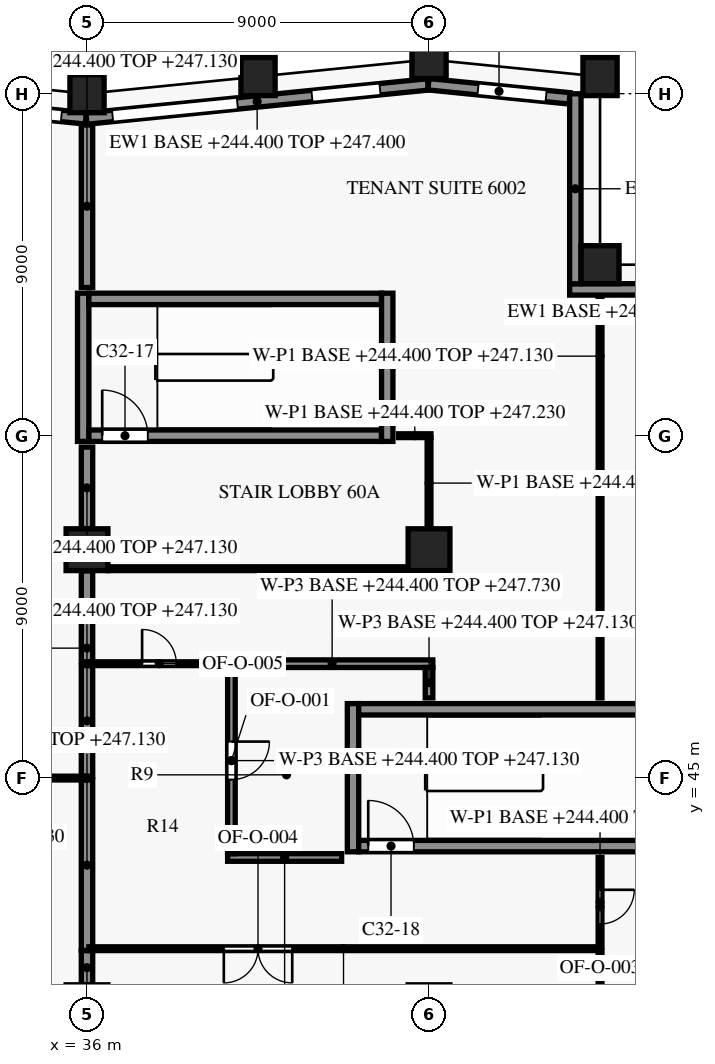
"""IFC4 building model, lengths in metres.
Left out: names, types, materials, properties, quantities, classifications, styles, units other than length and angle.
Written with IfcOpenShell. Run it as: python <this file> out.ifc"""

import sys

from ifc_helpers import new_model, si_unit, direction, frame, frame_2d, origin, origin_2d, place, context, subcontext, project, spatial, rectangle, extrude, element, fill, save


model = new_model("IFC4")
c1 = context("Model", 3, precision=1e-05, world=origin(), true_north=direction((0.0, 1.0)))
c2 = subcontext(c1, "Body", "Model", "MODEL_VIEW")
j1 = project(units=[si_unit("LENGTHUNIT", "METRE"), si_unit("PLANEANGLEUNIT", "RADIAN")], contexts=[c1])
p1 = place(None, origin())
s1 = spatial("IfcSite", under=j1, at=p1, CompositionType="ELEMENT")
p2 = place(p1, origin())
s2 = spatial("IfcBuilding", under=s1, at=p2, CompositionType="ELEMENT")
p3 = place(p2, frame((0.0, 0.0, 244.4)))
s3 = spatial("IfcBuildingStorey", under=s2, at=p3, CompositionType="ELEMENT", Elevation=244.4)
for number, where, z_axis, x_axis in (
    (1, (49.5, 63.45, 0.0), (0.0, 0.0, 1.0), (-0.995, 0.1, 0.0)),
    (2, (45.0, 63.9, 0.0), (0.0, 0.0, 1.0), (-1.0, 0.0, 0.0)),
    (3, (40.5, 63.45, 0.0), (0.0, 0.0, 1.0), (-0.995, -0.1, 0.0)),
    (4, (36.0, 63.0, 0.0), (0.0, 0.0, 1.0), (-1.0, 0.0, 0.0)),
):
    element("IfcColumn", number, at=place(p3, frame(where, z_axis=z_axis, x_axis=x_axis)), inside=s3, PredefinedType="COLUMN", context=c2, shape_type="SweptSolid", body=[
        extrude(rectangle(XDim=0.9, YDim=1.0, at=origin_2d()), origin(), (0.0, 0.0, 1.0), 3.8),
    ])
p4 = place(p3, frame((49.5, 58.5, 0.0), z_axis=(0.0, 0.0, 1.0), x_axis=(1.0, 0.0, 0.0)))
e5 = element("IfcColumn", 5, at=p4, inside=s3, PredefinedType="COLUMN", context=c2, shape_type="SweptSolid", body=[
    extrude(rectangle(XDim=1.0, YDim=1.0, at=origin_2d()), origin(), (0.0, 0.0, 1.0), 3.8),
])
for number, where, z_axis, x_axis in (
    (6, (36.0, 51.0, 0.0), (0.0, 0.0, 1.0), (1.0, 0.0, 0.0)),
    (7, (45.0, 51.0, 0.0), (0.0, 0.0, 1.0), (1.0, 0.0, 0.0)),
):
    element("IfcColumn", number, at=place(p3, frame(where, z_axis=z_axis, x_axis=x_axis)), inside=s3, PredefinedType="COLUMN", context=c2, shape_type="SweptSolid", body=[
        extrude(rectangle(XDim=1.1, YDim=1.1, at=origin_2d()), origin(), (0.0, 0.0, 1.0), 3.8),
    ])
p5 = place(p3, frame((48.7, 57.85, 0.0), z_axis=(0.0, 0.0, 1.0), x_axis=(1.0, 0.0, 0.0)))
e8 = element("IfcWall", 8, at=p5, inside=s3, PredefinedType="SOLIDWALL", context=c2, shape_type="SweptSolid", body=[
    extrude(rectangle(XDim=4.502, YDim=0.3, at=frame_2d((2.251, 0.0))), origin(), (0.0, 0.0, 1.0), 3.0),
])
p6 = place(p3, frame((48.85, 62.998, 0.0), z_axis=(0.0, 0.0, 1.0), x_axis=(0.0, -1.0, 0.0)))
e9 = element("IfcWall", 9, at=p6, inside=s3, PredefinedType="SOLIDWALL", context=c2, shape_type="SweptSolid", body=[
    extrude(rectangle(XDim=5.0, YDim=0.3, at=frame_2d((2.5, 0.0))), origin(), (0.0, 0.0, 1.0), 3.0),
])
p7 = place(p3, frame((44.985, 63.248, 0.0), z_axis=(0.0, 0.0, 1.0), x_axis=(0.995037837869, -0.099497242219, 0.0)))
e10 = element("IfcWall", 10, at=p7, inside=s3, PredefinedType="SOLIDWALL", context=c2, shape_type="SweptSolid", body=[
    extrude(rectangle(XDim=3.732, YDim=0.3, at=frame_2d((1.866, 0.0))), origin(), (0.0, 0.0, 1.0), 3.0),
])
p8 = place(p7, frame((1.311, 0.0, 0.75)))
e11 = element("IfcOpeningElement", 11, at=p8, cuts=e10, PredefinedType="OPENING", context=c2, shape_type="SweptSolid", body=[
    extrude(rectangle(XDim=1.8, YDim=1.8, at=frame_2d((0.9, 0.9))), frame((0.0, 0.16, 0.0), z_axis=(0.0, -1.0, 0.0), x_axis=(1.0, 0.0, 0.0)), (0.0, 0.0, 1.0), 0.32),
])
p9 = place(p3, frame((35.985, 62.345, 0.0), z_axis=(0.0, 0.0, 1.0), x_axis=(0.995035316196, 0.099522457379, 0.0)))
e12 = element("IfcWall", 12, at=p9, inside=s3, PredefinedType="SOLIDWALL", context=c2, shape_type="SweptSolid", body=[
    extrude(rectangle(XDim=9.03, YDim=0.3, at=frame_2d((4.515, 0.0))), origin(), (0.0, 0.0, 1.0), 3.0),
])
p10 = place(p9, frame((0.691, 0.0, 0.15)))
e13 = element("IfcOpeningElement", 13, at=p10, cuts=e12, PredefinedType="OPENING", context=c2, shape_type="SweptSolid", body=[
    extrude(rectangle(XDim=3.3, YDim=2.4, at=frame_2d((1.65, 1.2))), frame((0.0, 0.16, 0.0), z_axis=(0.0, -1.0, 0.0), x_axis=(1.0, 0.0, 0.0)), (0.0, 0.0, 1.0), 0.32),
])
p11 = place(p9, frame((5.964, 0.0, 0.75)))
e14 = element("IfcOpeningElement", 14, at=p11, cuts=e12, PredefinedType="OPENING", context=c2, shape_type="SweptSolid", body=[
    extrude(rectangle(XDim=1.8, YDim=1.8, at=frame_2d((0.9, 0.9))), frame((0.0, 0.16, 0.0), z_axis=(0.0, -1.0, 0.0), x_axis=(1.0, 0.0, 0.0)), (0.0, 0.0, 1.0), 0.32),
])
p12 = place(p3, frame((27.085, 63.238, 0.0), z_axis=(0.0, 0.0, 1.0), x_axis=(0.995035836657, -0.099517253618, 0.0)))
e15 = element("IfcWall", 15, at=p12, inside=s3, PredefinedType="SOLIDWALL", context=c2, shape_type="SweptSolid", body=[
    extrude(rectangle(XDim=8.93, YDim=0.3, at=frame_2d((4.465, 0.0))), origin(), (0.0, 0.0, 1.0), 3.0),
])
p13 = place(p12, frame((1.211, 0.0, 0.75)))
e16 = element("IfcOpeningElement", 16, at=p13, cuts=e15, PredefinedType="OPENING", context=c2, shape_type="SweptSolid", body=[
    extrude(rectangle(XDim=1.8, YDim=1.8, at=frame_2d((0.9, 0.9))), frame((0.0, 0.16, 0.0), z_axis=(0.0, -1.0, 0.0), x_axis=(1.0, 0.0, 0.0)), (0.0, 0.0, 1.0), 0.32),
])
p14 = place(p12, frame((4.984, 0.0, 0.15)))
e17 = element("IfcOpeningElement", 17, at=p14, cuts=e15, PredefinedType="OPENING", context=c2, shape_type="SweptSolid", body=[
    extrude(rectangle(XDim=3.3, YDim=2.4, at=frame_2d((1.65, 1.2))), frame((0.0, 0.16, 0.0), z_axis=(0.0, -1.0, 0.0), x_axis=(1.0, 0.0, 0.0)), (0.0, 0.0, 1.0), 0.32),
])
p15 = place(p3, frame((43.15, 43.2, 0.0), z_axis=(0.0, 0.0, 1.0), x_axis=(1.0, 0.0, 0.0)))
e18 = element("IfcWall", 18, at=p15, inside=s3, PredefinedType="SHEAR", context=c2, shape_type="SweptSolid", body=[
    extrude(rectangle(XDim=7.7, YDim=0.3, at=frame_2d((3.85, 0.0))), origin(), (0.0, 0.0, 1.0), 3.5),
])
p16 = place(p15, frame((0.25, 0.0, 0.0)))
e19 = element("IfcOpeningElement", 19, at=p16, cuts=e18, PredefinedType="OPENING", context=c2, shape_type="SweptSolid", body=[
    extrude(rectangle(XDim=1.2, YDim=2.2, at=frame_2d((0.6, 1.1))), frame((0.0, 0.16, 0.0), z_axis=(0.0, -1.0, 0.0), x_axis=(1.0, 0.0, 0.0)), (0.0, 0.0, 1.0), 0.32),
])
p17 = place(p3, frame((43.15, 46.8, 0.0), z_axis=(0.0, 0.0, 1.0), x_axis=(1.0, 0.0, 0.0)))
e20 = element("IfcWall", 20, at=p17, inside=s3, PredefinedType="SHEAR", context=c2, shape_type="SweptSolid", body=[
    extrude(rectangle(XDim=7.7, YDim=0.3, at=frame_2d((3.85, 0.0))), origin(), (0.0, 0.0, 1.0), 3.5),
])
p18 = place(p3, frame((36.05, 54.0, 0.0), z_axis=(0.0, 0.0, 1.0), x_axis=(1.0, 0.0, 0.0)))
e21 = element("IfcWall", 21, at=p18, inside=s3, PredefinedType="SHEAR", context=c2, shape_type="SweptSolid", body=[
    extrude(rectangle(XDim=7.7, YDim=0.3, at=frame_2d((3.85, 0.0))), origin(), (0.0, 0.0, 1.0), 3.5),
])
p19 = place(p18, frame((0.35, 0.0, 0.0)))
e22 = element("IfcOpeningElement", 22, at=p19, cuts=e21, PredefinedType="OPENING", context=c2, shape_type="SweptSolid", body=[
    extrude(rectangle(XDim=1.2, YDim=2.2, at=frame_2d((0.6, 1.1))), frame((0.0, 0.16, 0.0), z_axis=(0.0, -1.0, 0.0), x_axis=(1.0, 0.0, 0.0)), (0.0, 0.0, 1.0), 0.32),
])
p20 = place(p3, frame((36.05, 57.6, 0.0), z_axis=(0.0, 0.0, 1.0), x_axis=(1.0, 0.0, 0.0)))
e23 = element("IfcWall", 23, at=p20, inside=s3, PredefinedType="SHEAR", context=c2, shape_type="SweptSolid", body=[
    extrude(rectangle(XDim=7.7, YDim=0.3, at=frame_2d((3.85, 0.0))), origin(), (0.0, 0.0, 1.0), 3.5),
])
for number, where, z_axis, x_axis in (
    (24, (35.9, 53.85, 0.0), (0.0, 0.0, 1.0), (0.0, 1.0, 0.0)),
    (25, (43.0, 43.05, 0.0), (0.0, 0.0, 1.0), (0.0, 1.0, 0.0)),
    (26, (43.9, 53.85, 0.0), (0.0, 0.0, 1.0), (0.0, 1.0, 0.0)),
):
    element("IfcWall", number, at=place(p3, frame(where, z_axis=z_axis, x_axis=x_axis)), inside=s3, PredefinedType="SHEAR", context=c2, shape_type="SweptSolid", body=[
        extrude(rectangle(XDim=3.9, YDim=0.3, at=frame_2d((1.95, 0.0))), origin(), (0.0, 0.0, 1.0), 3.5),
    ])
p21 = place(p3, frame((49.5, 32.32, 0.0), z_axis=(0.0, 0.0, 1.0), x_axis=(0.0, 1.0, 0.0)))
e27 = element("IfcWall", 27, at=p21, inside=s3, PredefinedType="PARTITIONING", context=c2, shape_type="SweptSolid", body=[
    extrude(rectangle(XDim=8.13, YDim=0.1, at=frame_2d((4.065, 0.0))), origin(), (0.0, 0.0, 1.0), 2.73),
])
p22 = place(p3, frame((36.0, 39.555, 0.0), z_axis=(0.0, 0.0, 1.0), x_axis=(0.0, 1.0, 0.0)))
e28 = element("IfcWall", 28, at=p22, inside=s3, PredefinedType="PARTITIONING", context=c2, shape_type="SweptSolid", body=[
    extrude(rectangle(XDim=0.895, YDim=0.3, at=frame_2d((0.448, 0.0))), origin(), (0.0, 0.0, 1.0), 2.73),
])
p23 = place(p3, frame((49.45, 40.5, 0.0), z_axis=(0.0, 0.0, 1.0), x_axis=(-1.0, 0.0, 0.0)))
e29 = element("IfcWall", 29, at=p23, inside=s3, PredefinedType="PARTITIONING", context=c2, shape_type="SweptSolid", body=[
    extrude(rectangle(XDim=13.4, YDim=0.1, at=frame_2d((6.7, 0.0))), origin(), (0.0, 0.0, 1.0), 2.73),
])
p24 = place(p23, frame((8.05, 0.0, 0.0)))
e30 = element("IfcOpeningElement", 30, at=p24, cuts=e29, PredefinedType="OPENING", context=c2, shape_type="SweptSolid", body=[
    extrude(rectangle(XDim=1.8, YDim=2.1, at=frame_2d((0.9, 1.05))), frame((0.0, 0.06, 0.0), z_axis=(0.0, -1.0, 0.0), x_axis=(1.0, 0.0, 0.0)), (0.0, 0.0, 1.0), 0.12),
])
p25 = place(p3, frame((36.0, 40.455, 0.0), z_axis=(0.0, 0.0, 1.0), x_axis=(0.0, 1.0, 0.0)))
e31 = element("IfcWall", 31, at=p25, inside=s3, PredefinedType="PARTITIONING", context=c2, shape_type="SweptSolid", body=[
    extrude(rectangle(XDim=4.485, YDim=0.3, at=frame_2d((2.242, 0.0))), origin(), (0.0, 0.0, 1.0), 2.73),
])
p26 = place(p3, frame((39.7, 42.9, 0.0), z_axis=(0.0, 0.0, 1.0), x_axis=(1.0, 0.0, 0.0)))
e32 = element("IfcWall", 32, at=p26, inside=s3, PredefinedType="PARTITIONING", context=c2, shape_type="SweptSolid", body=[
    extrude(rectangle(XDim=3.0, YDim=0.2, at=frame_2d((1.5, 0.0))), origin(), (0.0, 0.0, 1.0), 2.73),
])
p27 = place(p3, frame((49.5, 42.9, 0.0), z_axis=(0.0, 0.0, 1.0), x_axis=(0.0, -1.0, 0.0)))
e33 = element("IfcWall", 33, at=p27, inside=s3, PredefinedType="PARTITIONING", context=c2, shape_type="SweptSolid", body=[
    extrude(rectangle(XDim=2.35, YDim=0.1, at=frame_2d((1.175, 0.0))), origin(), (0.0, 0.0, 1.0), 2.73),
])
p28 = place(p27, frame((0.85, 0.0, 0.0)))
e34 = element("IfcOpeningElement", 34, at=p28, cuts=e33, PredefinedType="OPENING", context=c2, shape_type="SweptSolid", body=[
    extrude(rectangle(XDim=0.9, YDim=2.1, at=frame_2d((0.45, 1.05))), frame((0.0, 0.06, 0.0), z_axis=(0.0, -1.0, 0.0), x_axis=(1.0, 0.0, 0.0)), (0.0, 0.0, 1.0), 0.12),
])
p29 = place(p3, frame((30.05, 44.99, 0.0), z_axis=(0.0, 0.0, 1.0), x_axis=(1.0, 0.0, 0.0)))
e35 = element("IfcWall", 35, at=p29, inside=s3, PredefinedType="PARTITIONING", context=c2, shape_type="SweptSolid", body=[
    extrude(rectangle(XDim=5.9, YDim=0.1, at=frame_2d((2.95, 0.0))), origin(), (0.0, 0.0, 1.0), 2.73),
])
p30 = place(p3, frame((36.0, 45.04, 0.0), z_axis=(0.0, 0.0, 1.0), x_axis=(0.0, 1.0, 0.0)))
e36 = element("IfcWall", 36, at=p30, inside=s3, PredefinedType="PARTITIONING", context=c2, shape_type="SweptSolid", body=[
    extrude(rectangle(XDim=2.91, YDim=0.3, at=frame_2d((1.455, 0.0))), origin(), (0.0, 0.0, 1.0), 2.73),
])
p31 = place(p3, frame((49.5, 47.1, 0.0), z_axis=(0.0, 0.0, 1.0), x_axis=(0.0, 1.0, 0.0)))
e37 = element("IfcWall", 37, at=p31, inside=s3, PredefinedType="PARTITIONING", context=c2, shape_type="SweptSolid", body=[
    extrude(rectangle(XDim=10.58, YDim=0.1, at=frame_2d((5.29, 0.0))), origin(), (0.0, 0.0, 1.0), 2.73),
])
p32 = place(p3, frame((39.8, 47.9, 0.0), z_axis=(0.0, 0.0, 1.0), x_axis=(0.0, -1.0, 0.0)))
e38 = element("IfcWall", 38, at=p32, inside=s3, PredefinedType="PARTITIONING", context=c2, shape_type="SweptSolid", body=[
    extrude(rectangle(XDim=4.9, YDim=0.2, at=frame_2d((2.45, 0.0))), origin(), (0.0, 0.0, 1.0), 2.73),
])
p33 = place(p32, frame((1.95, 0.0, 0.0)))
e39 = element("IfcOpeningElement", 39, at=p33, cuts=e38, PredefinedType="OPENING", context=c2, shape_type="SweptSolid", body=[
    extrude(rectangle(XDim=1.0, YDim=2.1, at=frame_2d((0.5, 1.05))), frame((0.0, 0.11, 0.0), z_axis=(0.0, -1.0, 0.0), x_axis=(1.0, 0.0, 0.0)), (0.0, 0.0, 1.0), 0.22),
])
p34 = place(p3, frame((45.0, 47.9, 0.0), z_axis=(0.0, 0.0, 1.0), x_axis=(0.0, -1.0, 0.0)))
e40 = element("IfcWall", 40, at=p34, inside=s3, PredefinedType="PARTITIONING", context=c2, shape_type="SweptSolid", body=[
    extrude(rectangle(XDim=0.8, YDim=0.2, at=frame_2d((0.4, 0.0))), origin(), (0.0, 0.0, 1.0), 2.73),
])
p35 = place(p3, frame((36.05, 48.0, 0.0), z_axis=(0.0, 0.0, 1.0), x_axis=(1.0, 0.0, 0.0)))
e41 = element("IfcWall", 41, at=p35, inside=s3, PredefinedType="PARTITIONING", context=c2, shape_type="SweptSolid", body=[
    extrude(rectangle(XDim=3.75, YDim=0.1, at=frame_2d((1.875, 0.0))), origin(), (0.0, 0.0, 1.0), 2.73),
])
p36 = place(p35, frame((1.4, 0.0, 0.0)))
e42 = element("IfcOpeningElement", 42, at=p36, cuts=e41, PredefinedType="OPENING", context=c2, shape_type="SweptSolid", body=[
    extrude(rectangle(XDim=0.9, YDim=2.1, at=frame_2d((0.45, 1.05))), frame((0.0, 0.06, 0.0), z_axis=(0.0, -1.0, 0.0), x_axis=(1.0, 0.0, 0.0)), (0.0, 0.0, 1.0), 0.12),
])
p37 = place(p3, frame((39.8, 48.0, 0.0), z_axis=(0.0, 0.0, 1.0), x_axis=(1.0, 0.0, 0.0)))
e43 = element("IfcWall", 43, at=p37, inside=s3, PredefinedType="PARTITIONING", context=c2, shape_type="SweptSolid", body=[
    extrude(rectangle(XDim=5.3, YDim=0.2, at=frame_2d((2.65, 0.0))), origin(), (0.0, 0.0, 1.0), 3.33),
])
p38 = place(p3, frame((36.0, 48.05, 0.0), z_axis=(0.0, 0.0, 1.0), x_axis=(0.0, 1.0, 0.0)))
e44 = element("IfcWall", 44, at=p38, inside=s3, PredefinedType="PARTITIONING", context=c2, shape_type="SweptSolid", body=[
    extrude(rectangle(XDim=2.395, YDim=0.3, at=frame_2d((1.198, 0.0))), origin(), (0.0, 0.0, 1.0), 2.73),
])
p39 = place(p3, frame((44.445, 50.5, 0.0), z_axis=(0.0, 0.0, 1.0), x_axis=(-1.0, 0.0, 0.0)))
e45 = element("IfcWall", 45, at=p39, inside=s3, PredefinedType="PARTITIONING", context=c2, shape_type="SweptSolid", body=[
    extrude(rectangle(XDim=7.89, YDim=0.1, at=frame_2d((3.945, 0.0))), origin(), (0.0, 0.0, 1.0), 3.33),
])
p40 = place(p3, frame((36.0, 51.555, 0.0), z_axis=(0.0, 0.0, 1.0), x_axis=(0.0, 1.0, 0.0)))
e46 = element("IfcWall", 46, at=p40, inside=s3, PredefinedType="PARTITIONING", context=c2, shape_type="SweptSolid", body=[
    extrude(rectangle(XDim=2.145, YDim=0.3, at=frame_2d((1.073, 0.0))), origin(), (0.0, 0.0, 1.0), 2.73),
])
p41 = place(p3, frame((45.0, 53.95, 0.0), z_axis=(0.0, 0.0, 1.0), x_axis=(0.0, -1.0, 0.0)))
e47 = element("IfcWall", 47, at=p41, inside=s3, PredefinedType="PARTITIONING", context=c2, shape_type="SweptSolid", body=[
    extrude(rectangle(XDim=2.395, YDim=0.1, at=frame_2d((1.198, 0.0))), origin(), (0.0, 0.0, 1.0), 2.83),
])
p42 = place(p3, frame((44.2, 54.0, 0.0), z_axis=(0.0, 0.0, 1.0), x_axis=(1.0, 0.0, 0.0)))
e48 = element("IfcWall", 48, at=p42, inside=s3, PredefinedType="PARTITIONING", context=c2, shape_type="SweptSolid", body=[
    extrude(rectangle(XDim=0.85, YDim=0.1, at=frame_2d((0.425, 0.0))), origin(), (0.0, 0.0, 1.0), 2.83),
])
p43 = place(p3, frame((36.0, 57.9, 0.0), z_axis=(0.0, 0.0, 1.0), x_axis=(0.0, 1.0, 0.0)))
e49 = element("IfcWall", 49, at=p43, inside=s3, PredefinedType="PARTITIONING", context=c2, shape_type="SweptSolid", body=[
    extrude(rectangle(XDim=4.276, YDim=0.3, at=frame_2d((2.138, 0.0))), origin(), (0.0, 0.0, 1.0), 2.73),
])
p44 = place(p8, origin())
e50 = element("IfcWindow", 50, at=p44, inside=s3, PartitioningType="SINGLE_PANEL", PredefinedType="WINDOW", context=c2, shape_type="SweptSolid", body=[
    extrude(rectangle(XDim=1.8, YDim=1.8, at=frame_2d((0.9, 0.9))), frame((0.0, 0.03, 0.0), z_axis=(0.0, -1.0, 0.0), x_axis=(1.0, 0.0, 0.0)), (0.0, 0.0, 1.0), 0.06),
])
fill(e11, e50)
p45 = place(p10, origin())
e51 = element("IfcWindow", 51, at=p45, inside=s3, PartitioningType="SINGLE_PANEL", PredefinedType="WINDOW", context=c2, shape_type="SweptSolid", body=[
    extrude(rectangle(XDim=3.3, YDim=2.4, at=frame_2d((1.65, 1.2))), frame((0.0, 0.03, 0.0), z_axis=(0.0, -1.0, 0.0), x_axis=(1.0, 0.0, 0.0)), (0.0, 0.0, 1.0), 0.06),
])
fill(e13, e51)
p46 = place(p11, origin())
e52 = element("IfcWindow", 52, at=p46, inside=s3, PartitioningType="SINGLE_PANEL", PredefinedType="WINDOW", context=c2, shape_type="SweptSolid", body=[
    extrude(rectangle(XDim=1.8, YDim=1.8, at=frame_2d((0.9, 0.9))), frame((0.0, 0.03, 0.0), z_axis=(0.0, -1.0, 0.0), x_axis=(1.0, 0.0, 0.0)), (0.0, 0.0, 1.0), 0.06),
])
fill(e14, e52)
p47 = place(p14, origin())
e53 = element("IfcWindow", 53, at=p47, inside=s3, PartitioningType="SINGLE_PANEL", PredefinedType="WINDOW", context=c2, shape_type="SweptSolid", body=[
    extrude(rectangle(XDim=3.3, YDim=2.4, at=frame_2d((1.65, 1.2))), frame((0.0, 0.03, 0.0), z_axis=(0.0, -1.0, 0.0), x_axis=(1.0, 0.0, 0.0)), (0.0, 0.0, 1.0), 0.06),
])
fill(e17, e53)
p48 = place(p19, origin())
e54 = element("IfcDoor", 54, at=p48, inside=s3, OperationType="SINGLE_SWING_LEFT", PredefinedType="DOOR", context=c2, shape_type="SweptSolid", body=[
    extrude(rectangle(XDim=1.2, YDim=2.2, at=frame_2d((0.6, 1.1))), frame((0.0, 0.025, 0.0), z_axis=(0.0, -1.0, 0.0), x_axis=(1.0, 0.0, 0.0)), (0.0, 0.0, 1.0), 0.05),
])
fill(e22, e54)
p49 = place(p16, origin())
e55 = element("IfcDoor", 55, at=p49, inside=s3, OperationType="SINGLE_SWING_RIGHT", PredefinedType="DOOR", context=c2, shape_type="SweptSolid", body=[
    extrude(rectangle(XDim=1.2, YDim=2.2, at=frame_2d((0.6, 1.1))), frame((0.0, 0.025, 0.0), z_axis=(0.0, -1.0, 0.0), x_axis=(1.0, 0.0, 0.0)), (0.0, 0.0, 1.0), 0.05),
])
fill(e19, e55)
p50 = place(p33, origin())
e56 = element("IfcDoor", 56, at=p50, inside=s3, OperationType="SINGLE_SWING_RIGHT", PredefinedType="DOOR", context=c2, shape_type="SweptSolid", body=[
    extrude(rectangle(XDim=1.0, YDim=2.1, at=frame_2d((0.5, 1.05))), frame((0.0, 0.025, 0.0), z_axis=(0.0, -1.0, 0.0), x_axis=(1.0, 0.0, 0.0)), (0.0, 0.0, 1.0), 0.05),
])
fill(e39, e56)
p51 = place(p28, origin())
e57 = element("IfcDoor", 57, at=p51, inside=s3, OperationType="SINGLE_SWING_LEFT", PredefinedType="DOOR", context=c2, shape_type="SweptSolid", body=[
    extrude(rectangle(XDim=0.9, YDim=2.1, at=frame_2d((0.45, 1.05))), frame((0.0, 0.025, 0.0), z_axis=(0.0, -1.0, 0.0), x_axis=(1.0, 0.0, 0.0)), (0.0, 0.0, 1.0), 0.05),
])
fill(e34, e57)
p52 = place(p24, origin())
e58 = element("IfcDoor", 58, at=p52, inside=s3, OperationType="DOUBLE_DOOR_SINGLE_SWING", PredefinedType="DOOR", context=c2, shape_type="SweptSolid", body=[
    extrude(rectangle(XDim=1.8, YDim=2.1, at=frame_2d((0.9, 1.05))), frame((0.0, 0.025, 0.0), z_axis=(0.0, -1.0, 0.0), x_axis=(1.0, 0.0, 0.0)), (0.0, 0.0, 1.0), 0.05),
])
fill(e30, e58)
p53 = place(p36, origin())
e59 = element("IfcDoor", 59, at=p53, inside=s3, OperationType="SINGLE_SWING_LEFT", PredefinedType="DOOR", context=c2, shape_type="SweptSolid", body=[
    extrude(rectangle(XDim=0.9, YDim=2.1, at=frame_2d((0.45, 1.05))), frame((0.0, 0.025, 0.0), z_axis=(0.0, -1.0, 0.0), x_axis=(1.0, 0.0, 0.0)), (0.0, 0.0, 1.0), 0.05),
])
fill(e42, e59)
save(model, sys.argv[1])
